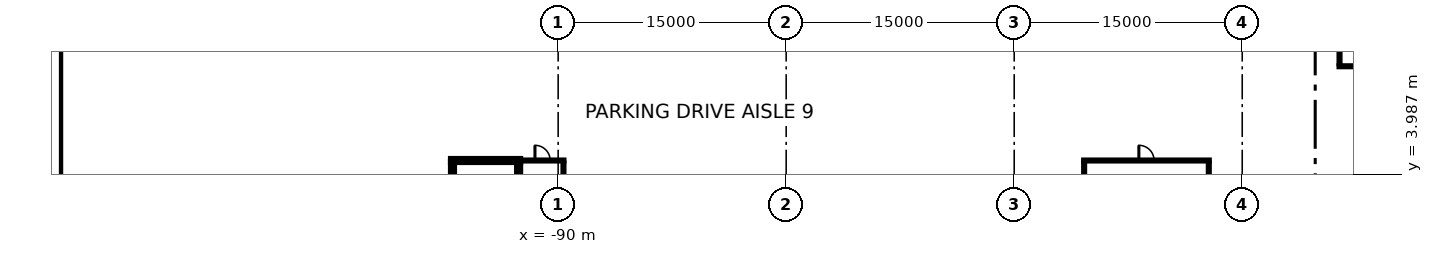
"""IFC4 building model, lengths in metres.
Left out: names, types, materials, properties, quantities, classifications, styles, units other than length and angle.
Written with IfcOpenShell. Run it as: python <this file> out.ifc"""

import sys

from ifc_helpers import new_model, si_unit, direction, frame, frame_2d, origin, place, context, subcontext, project, spatial, rectangle, extrude, element, fill, save


model = new_model("IFC4")
c1 = context("Model", 3, precision=1e-05, world=origin(), true_north=direction((0.0, 1.0)))
c2 = subcontext(c1, "Body", "Model", "MODEL_VIEW")
j1 = project(units=[si_unit("LENGTHUNIT", "METRE"), si_unit("PLANEANGLEUNIT", "RADIAN")], contexts=[c1])
p1 = place(None, origin())
s1 = spatial("IfcSite", under=j1, at=p1, CompositionType="ELEMENT")
p2 = place(p1, origin())
s2 = spatial("IfcBuilding", under=s1, at=p2, CompositionType="ELEMENT")
p3 = place(p2, frame((0.0, 0.0, -12.0)))
s3 = spatial("IfcBuildingStorey", under=s2, at=p3, CompositionType="ELEMENT", Elevation=-12.0)
p4 = place(p3, frame((-123.15, -80.0, 0.0), z_axis=(0.0, 0.0, 1.0), x_axis=(0.0, 1.0, 0.0)))
e1 = element("IfcWall", 1, at=p4, inside=s3, PredefinedType="USERDEFINED", context=c2, shape_type="SweptSolid", body=[
    extrude(rectangle(XDim=160.0, YDim=0.9, at=frame_2d((80.0, 0.0))), origin(), (0.0, 0.0, 1.0), 11.55),
])
p5 = place(p2, frame((0.0, 0.0, -3.6)))
s4 = spatial("IfcBuildingStorey", under=s2, at=p5, CompositionType="ELEMENT", Elevation=-3.6)
p6 = place(p5, frame((-38.7, 11.1, 0.0), z_axis=(0.0, 0.0, 1.0), x_axis=(1.0, 0.0, 0.0)))
e2 = element("IfcWall", 2, at=p6, inside=s4, PredefinedType="PARTITIONING", context=c2, shape_type="SweptSolid", body=[
    extrude(rectangle(XDim=5.6, YDim=0.2, at=frame_2d((2.8, 0.0))), origin(), (0.0, 0.0, 1.0), 3.15),
])
p7 = place(p6, frame((2.3, 0.0, 0.0)))
e3 = element("IfcOpeningElement", 3, at=p7, cuts=e2, PredefinedType="OPENING", context=c2, shape_type="SweptSolid", body=[
    extrude(rectangle(XDim=1.0, YDim=2.1, at=frame_2d((0.5, 1.05))), frame((0.0, 0.11, 0.0), z_axis=(0.0, -1.0, 0.0), x_axis=(1.0, 0.0, 0.0)), (0.0, 0.0, 1.0), 0.22),
])
p8 = place(p5, frame((-38.6, 11.2, 0.0), z_axis=(0.0, 0.0, 1.0), x_axis=(0.0, 1.0, 0.0)))
e4 = element("IfcWall", 4, at=p8, inside=s4, PredefinedType="PARTITIONING", context=c2, shape_type="SweptSolid", body=[
    extrude(rectangle(XDim=4.2, YDim=0.2, at=frame_2d((2.1, 0.0))), origin(), (0.0, 0.0, 1.0), 3.15),
])
p9 = place(p5, frame((-55.5, 4.9, 0.0), z_axis=(0.0, 0.0, 1.0), x_axis=(1.0, 0.0, 0.0)))
e5 = element("IfcWall", 5, at=p9, inside=s4, PredefinedType="PARTITIONING", context=c2, shape_type="SweptSolid", body=[
    extrude(rectangle(XDim=8.4, YDim=0.2, at=frame_2d((4.2, 0.0))), origin(), (0.0, 0.0, 1.0), 3.15),
])
p10 = place(p9, frame((3.7, 0.0, 0.0)))
e6 = element("IfcOpeningElement", 6, at=p10, cuts=e5, PredefinedType="OPENING", context=c2, shape_type="SweptSolid", body=[
    extrude(rectangle(XDim=1.0, YDim=2.1, at=frame_2d((0.5, 1.05))), frame((0.0, 0.11, 0.0), z_axis=(0.0, -1.0, 0.0), x_axis=(1.0, 0.0, 0.0)), (0.0, 0.0, 1.0), 0.22),
])
for number, where, z_axis, x_axis in (
    (7, (-55.4, 0.6, 0.0), (0.0, 0.0, 1.0), (0.0, 1.0, 0.0)),
    (8, (-47.2, 0.6, 0.0), (0.0, 0.0, 1.0), (0.0, 1.0, 0.0)),
):
    element("IfcWall", number, at=place(p5, frame(where, z_axis=z_axis, x_axis=x_axis)), inside=s4, PredefinedType="PARTITIONING", context=c2, shape_type="SweptSolid", body=[
        extrude(rectangle(XDim=4.2, YDim=0.2, at=frame_2d((2.1, 0.0))), origin(), (0.0, 0.0, 1.0), 3.15),
    ])
p11 = place(p5, frame((-92.5, 4.9, 0.0), z_axis=(0.0, 0.0, 1.0), x_axis=(1.0, 0.0, 0.0)))
e9 = element("IfcWall", 9, at=p11, inside=s4, PredefinedType="PARTITIONING", context=c2, shape_type="SweptSolid", body=[
    extrude(rectangle(XDim=2.95, YDim=0.2, at=frame_2d((1.475, 0.0))), origin(), (0.0, 0.0, 1.0), 3.15),
])
p12 = place(p11, frame((0.975, 0.0, 0.0)))
e10 = element("IfcOpeningElement", 10, at=p12, cuts=e9, PredefinedType="OPENING", context=c2, shape_type="SweptSolid", body=[
    extrude(rectangle(XDim=1.0, YDim=2.1, at=frame_2d((0.5, 1.05))), frame((0.0, 0.11, 0.0), z_axis=(0.0, -1.0, 0.0), x_axis=(1.0, 0.0, 0.0)), (0.0, 0.0, 1.0), 0.22),
])
p13 = place(p5, frame((-89.65, -0.8, 0.0), z_axis=(0.0, 0.0, 1.0), x_axis=(0.0, 1.0, 0.0)))
e11 = element("IfcWall", 11, at=p13, inside=s4, PredefinedType="PARTITIONING", context=c2, shape_type="SweptSolid", body=[
    extrude(rectangle(XDim=5.6, YDim=0.2, at=frame_2d((2.8, 0.0))), origin(), (0.0, 0.0, 1.0), 3.15),
])
p14 = place(p5, frame((-96.95, -4.8, 0.0), z_axis=(0.0, 0.0, 1.0), x_axis=(0.0, 1.0, 0.0)))
e12 = element("IfcWall", 12, at=p14, inside=s4, PredefinedType="SOLIDWALL", context=c2, shape_type="SweptSolid", body=[
    extrude(rectangle(XDim=9.6, YDim=0.2, at=frame_2d((4.8, 0.0))), origin(), (0.0, 0.0, 1.0), 3.15),
])
p15 = place(p5, frame((-92.6, -4.8, 0.0), z_axis=(0.0, 0.0, 1.0), x_axis=(0.0, 1.0, 0.0)))
e13 = element("IfcWall", 13, at=p15, inside=s4, PredefinedType="SOLIDWALL", context=c2, shape_type="SweptSolid", body=[
    extrude(rectangle(XDim=9.6, YDim=0.2, at=frame_2d((4.8, 0.0))), origin(), (0.0, 0.0, 1.0), 3.15),
])
p16 = place(p15, frame((0.4, 0.0, 0.0)))
e14 = element("IfcOpeningElement", 14, at=p16, cuts=e13, PredefinedType="OPENING", context=c2, shape_type="SweptSolid", body=[
    extrude(rectangle(XDim=1.2, YDim=2.1, at=frame_2d((0.6, 1.05))), frame((0.0, 0.11, 0.0), z_axis=(0.0, -1.0, 0.0), x_axis=(1.0, 0.0, 0.0)), (0.0, 0.0, 1.0), 0.22),
])
p17 = place(p5, frame((-97.05, 4.9, 0.0), z_axis=(0.0, 0.0, 1.0), x_axis=(1.0, 0.0, 0.0)))
e15 = element("IfcWall", 15, at=p17, inside=s4, PredefinedType="SOLIDWALL", context=c2, shape_type="SweptSolid", body=[
    extrude(rectangle(XDim=4.55, YDim=0.2, at=frame_2d((2.275, 0.0))), origin(), (0.0, 0.0, 1.0), 3.15),
])
p18 = place(p10, origin())
e16 = element("IfcDoor", 16, at=p18, inside=s4, OperationType="SINGLE_SWING_LEFT", PredefinedType="DOOR", context=c2, shape_type="SweptSolid", body=[
    extrude(rectangle(XDim=1.0, YDim=2.1, at=frame_2d((0.5, 1.05))), frame((0.0, 0.025, 0.0), z_axis=(0.0, -1.0, 0.0), x_axis=(1.0, 0.0, 0.0)), (0.0, 0.0, 1.0), 0.05),
])
fill(e6, e16)
p19 = place(p12, origin())
e17 = element("IfcDoor", 17, at=p19, inside=s4, OperationType="SINGLE_SWING_LEFT", PredefinedType="DOOR", context=c2, shape_type="SweptSolid", body=[
    extrude(rectangle(XDim=1.0, YDim=2.1, at=frame_2d((0.5, 1.05))), frame((0.0, 0.025, 0.0), z_axis=(0.0, -1.0, 0.0), x_axis=(1.0, 0.0, 0.0)), (0.0, 0.0, 1.0), 0.05),
])
fill(e10, e17)
save(model, sys.argv[1])
